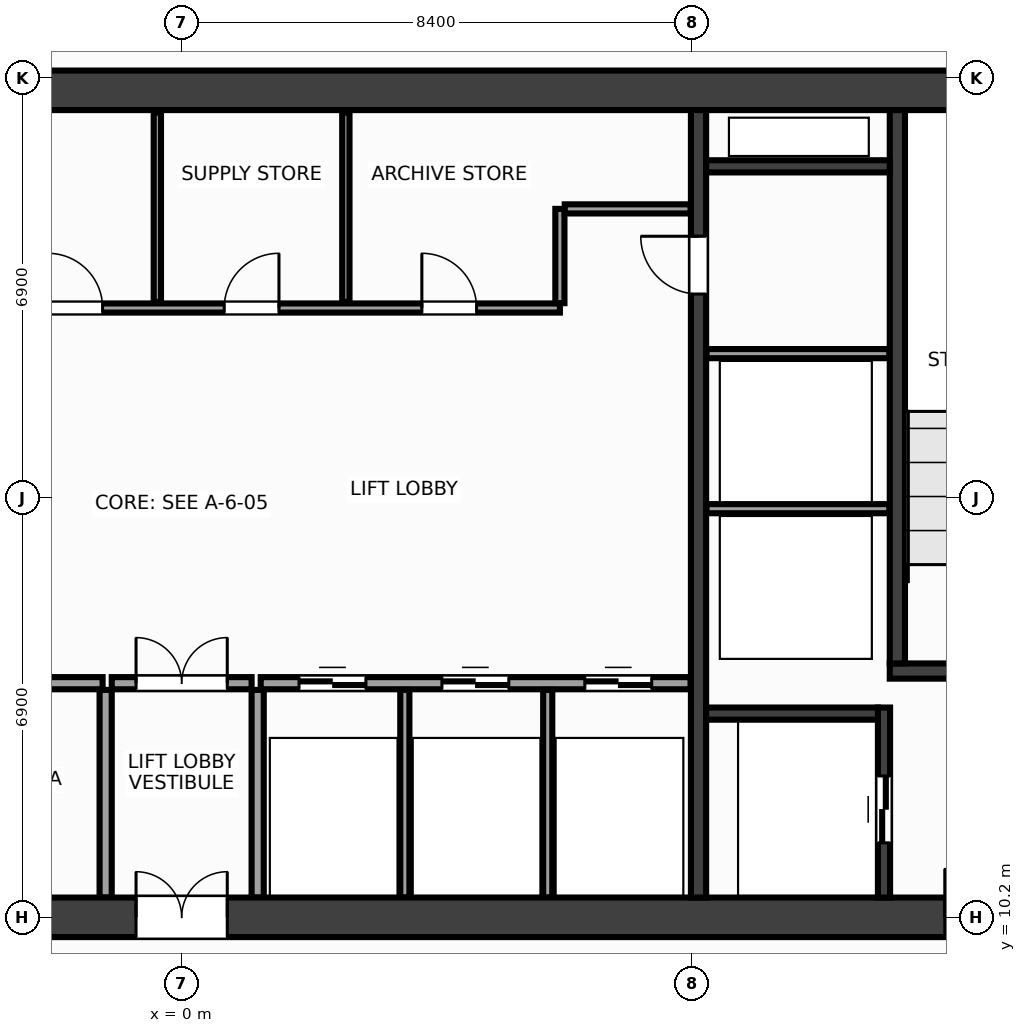
"""IFC4 building model, lengths in metres.
Left out: names, types, materials, properties, quantities, classifications, styles, units other than length and angle.
Written with IfcOpenShell. Run it as: python <this file> out.ifc"""

import sys

from ifc_helpers import new_model, si_unit, direction, frame, frame_2d, origin, place, context, subcontext, project, spatial, rectangle, extrude, source, transform, mapped, element, fill, save


model = new_model("IFC4")
c1 = context("Model", 3, precision=1e-05, world=origin(), true_north=direction((0.0, 1.0)))
c2 = subcontext(c1, "Body", "Model", "MODEL_VIEW")
j1 = project(units=[si_unit("LENGTHUNIT", "METRE"), si_unit("PLANEANGLEUNIT", "RADIAN")], contexts=[c1])
p1 = place(None, origin())
s1 = spatial("IfcSite", under=j1, at=p1, CompositionType="ELEMENT")
p2 = place(p1, origin())
s2 = spatial("IfcBuilding", under=s1, at=p2, CompositionType="ELEMENT")
p3 = place(p2, frame((0.0, 0.0, 142.4)))
s3 = spatial("IfcBuildingStorey", under=s2, at=p3, CompositionType="ELEMENT", Elevation=142.4)
m1 = source(origin(), c2, "Body", "SweptSolid", [
    extrude(rectangle(XDim=31.85, YDim=0.65, at=frame_2d((15.925, 0.0))), origin(), (0.0, 0.0, 1.0), 3.6),
])
p4 = place(p3, frame((-15.925, 23.8, 0.0), z_axis=(0.0, 0.0, 1.0), x_axis=(1.0, 0.0, 0.0)))
e1 = element("IfcWall", 1, at=p4, inside=s3, PredefinedType="SHEAR", context=c2, shape_type="MappedRepresentation", body=[
    mapped(m1, transform((0.0, 0.0, 0.0), x_axis=(1.0, 0.0, 0.0), y_axis=(0.0, 1.0, 0.0), z_axis=(0.0, 0.0, 1.0), scale=1.0)),
])
p5 = place(p3, frame((-15.925, 10.2, 0.0), z_axis=(0.0, 0.0, 1.0), x_axis=(1.0, 0.0, 0.0)))
e2 = element("IfcWall", 2, at=p5, inside=s3, PredefinedType="SHEAR", context=c2, shape_type="MappedRepresentation", body=[
    mapped(m1, transform((0.0, 0.0, 0.0), x_axis=(1.0, 0.0, 0.0), y_axis=(0.0, 1.0, 0.0), z_axis=(0.0, 0.0, 1.0), scale=1.0)),
])
p6 = place(p5, frame((1.775, 0.0, 0.0)))
e3 = element("IfcOpeningElement", 3, at=p6, cuts=e2, PredefinedType="OPENING", context=c2, shape_type="SweptSolid", body=[
    extrude(rectangle(XDim=1.6, YDim=2.15, at=frame_2d((0.8, 1.075))), frame((0.0, 0.337, 0.0), z_axis=(0.0, -1.0, 0.0), x_axis=(1.0, 0.0, 0.0)), (0.0, 0.0, 1.0), 0.674),
])
p7 = place(p5, frame((28.475, 0.0, 0.0)))
e4 = element("IfcOpeningElement", 4, at=p7, cuts=e2, PredefinedType="OPENING", context=c2, shape_type="SweptSolid", body=[
    extrude(rectangle(XDim=1.6, YDim=2.15, at=frame_2d((0.8, 1.075))), frame((0.0, 0.337, 0.0), z_axis=(0.0, -1.0, 0.0), x_axis=(1.0, 0.0, 0.0)), (0.0, 0.0, 1.0), 0.674),
])
p8 = place(p5, frame((15.175, 0.0, 0.0)))
e5 = element("IfcOpeningElement", 5, at=p8, cuts=e2, PredefinedType="OPENING", context=c2, shape_type="SweptSolid", body=[
    extrude(rectangle(XDim=1.5, YDim=2.2, at=frame_2d((0.75, 1.1))), frame((0.0, 0.337, 0.0), z_axis=(0.0, -1.0, 0.0), x_axis=(1.0, 0.0, 0.0)), (0.0, 0.0, 1.0), 0.674),
])
m2 = source(origin(), c2, "Body", "SweptSolid", [
    extrude(rectangle(XDim=12.95, YDim=0.25, at=frame_2d((6.475, 0.0))), origin(), (0.0, 0.0, 1.0), 3.6),
])
p9 = place(p3, frame((8.5, 10.525, 0.0), z_axis=(0.0, 0.0, 1.0), x_axis=(0.0, 1.0, 0.0)))
e6 = element("IfcWall", 6, at=p9, inside=s3, PredefinedType="SHEAR", context=c2, shape_type="MappedRepresentation", body=[
    mapped(m2, transform((0.0, 0.0, 0.0), x_axis=(1.0, 0.0, 0.0), y_axis=(0.0, 1.0, 0.0), z_axis=(0.0, 0.0, 1.0), scale=1.0)),
])
p10 = place(p9, frame((9.925, 0.0, 0.0)))
e7 = element("IfcOpeningElement", 7, at=p10, cuts=e6, PredefinedType="OPENING", context=c2, shape_type="SweptSolid", body=[
    extrude(rectangle(XDim=0.95, YDim=2.15, at=frame_2d((0.475, 1.075))), frame((0.0, 0.137, 0.0), z_axis=(0.0, -1.0, 0.0), x_axis=(1.0, 0.0, 0.0)), (0.0, 0.0, 1.0), 0.274),
])
m3 = source(origin(), c2, "Body", "SweptSolid", [
    extrude(rectangle(XDim=3.63, YDim=0.25, at=frame_2d((1.815, 0.0))), origin(), (0.0, 0.0, 1.0), 3.6),
])
p11 = place(p3, frame((11.645, 14.25, 0.0), z_axis=(0.0, 0.0, 1.0), x_axis=(1.0, 0.0, 0.0)))
e8 = element("IfcWall", 8, at=p11, inside=s3, PredefinedType="SHEAR", context=c2, shape_type="MappedRepresentation", body=[
    mapped(m3, transform((0.0, 0.0, 0.0), x_axis=(1.0, 0.0, 0.0), y_axis=(0.0, 1.0, 0.0), z_axis=(0.0, 0.0, 1.0), scale=1.0)),
])
p12 = place(p11, frame((0.95, 0.0, 0.0)))
e9 = element("IfcOpeningElement", 9, at=p12, cuts=e8, PredefinedType="OPENING", context=c2, shape_type="SweptSolid", body=[
    extrude(rectangle(XDim=1.6, YDim=2.15, at=frame_2d((0.8, 1.075))), frame((0.0, 0.137, 0.0), z_axis=(0.0, -1.0, 0.0), x_axis=(1.0, 0.0, 0.0)), (0.0, 0.0, 1.0), 0.274),
])
m4 = source(origin(), c2, "Body", "SweptSolid", [
    extrude(rectangle(XDim=9.1, YDim=0.25, at=frame_2d((4.55, 0.0))), origin(), (0.0, 0.0, 1.0), 3.6),
])
p13 = place(p3, frame((11.77, 14.375, 0.0), z_axis=(0.0, 0.0, 1.0), x_axis=(0.0, 1.0, 0.0)))
e10 = element("IfcWall", 10, at=p13, inside=s3, PredefinedType="SHEAR", context=c2, shape_type="MappedRepresentation", body=[
    mapped(m4, transform((0.0, 0.0, 0.0), x_axis=(1.0, 0.0, 0.0), y_axis=(0.0, 1.0, 0.0), z_axis=(0.0, 0.0, 1.0), scale=1.0)),
])
m5 = source(origin(), c2, "Body", "SweptSolid", [
    extrude(rectangle(XDim=3.125, YDim=0.2, at=frame_2d((1.562, 0.0))), origin(), (0.0, 0.0, 1.0), 3.6),
])
p14 = place(p3, frame((11.55, 10.525, 0.0), z_axis=(0.0, 0.0, 1.0), x_axis=(0.0, 1.0, 0.0)))
e11 = element("IfcWall", 11, at=p14, inside=s3, PredefinedType="SHEAR", context=c2, shape_type="MappedRepresentation", body=[
    mapped(m5, transform((0.0, 0.0, 0.0), x_axis=(1.0, 0.0, 0.0), y_axis=(0.0, 1.0, 0.0), z_axis=(0.0, 0.0, 1.0), scale=1.0)),
])
p15 = place(p14, frame((0.9, 0.0, 0.0)))
e12 = element("IfcOpeningElement", 12, at=p15, cuts=e11, PredefinedType="OPENING", context=c2, shape_type="SweptSolid", body=[
    extrude(rectangle(XDim=1.1, YDim=2.15, at=frame_2d((0.55, 1.075))), frame((0.0, 0.112, 0.0), z_axis=(0.0, -1.0, 0.0), x_axis=(1.0, 0.0, 0.0)), (0.0, 0.0, 1.0), 0.224),
])
m6 = source(origin(), c2, "Body", "SweptSolid", [
    extrude(rectangle(XDim=2.825, YDim=0.2, at=frame_2d((1.413, 0.0))), origin(), (0.0, 0.0, 1.0), 3.6),
])
p16 = place(p3, frame((8.625, 13.55, 0.0), z_axis=(0.0, 0.0, 1.0), x_axis=(1.0, 0.0, 0.0)))
e13 = element("IfcWall", 13, at=p16, inside=s3, PredefinedType="SHEAR", context=c2, shape_type="MappedRepresentation", body=[
    mapped(m6, transform((0.0, 0.0, 0.0), x_axis=(1.0, 0.0, 0.0), y_axis=(0.0, 1.0, 0.0), z_axis=(0.0, 0.0, 1.0), scale=1.0)),
])
m7 = source(origin(), c2, "Body", "SweptSolid", [
    extrude(rectangle(XDim=3.02, YDim=0.2, at=frame_2d((1.51, 0.0))), origin(), (0.0, 0.0, 1.0), 3.6),
])
p17 = place(p3, frame((8.625, 22.55, 0.0), z_axis=(0.0, 0.0, 1.0), x_axis=(1.0, 0.0, 0.0)))
e14 = element("IfcWall", 14, at=p17, inside=s3, PredefinedType="SHEAR", context=c2, shape_type="MappedRepresentation", body=[
    mapped(m7, transform((0.0, 0.0, 0.0), x_axis=(1.0, 0.0, 0.0), y_axis=(0.0, 1.0, 0.0), z_axis=(0.0, 0.0, 1.0), scale=1.0)),
])
m8 = source(origin(), c2, "Body", "SweptSolid", [
    extrude(rectangle(XDim=3.01, YDim=0.15, at=frame_2d((1.505, 0.0))), origin(), (0.0, 0.0, 1.0), 3.38),
])
for number, where, z_axis, x_axis in (
    (15, (8.63, 16.92, 0.0), (0.0, 0.0, 1.0), (1.0, 0.0, 0.0)),
    (16, (8.63, 19.47, 0.0), (0.0, 0.0, 1.0), (1.0, 0.0, 0.0)),
):
    element("IfcWall", number, at=place(p3, frame(where, z_axis=z_axis, x_axis=x_axis)), inside=s3, PredefinedType="PARTITIONING", context=c2, shape_type="MappedRepresentation", body=[
        mapped(m8, transform((0.0, 0.0, 0.0), x_axis=(1.0, 0.0, 0.0), y_axis=(0.0, 1.0, 0.0), z_axis=(0.0, 0.0, 1.0), scale=1.0)),
    ])
m9 = source(origin(), c2, "Body", "SweptSolid", [
    extrude(rectangle(XDim=7.07, YDim=0.2, at=frame_2d((3.535, 0.0))), origin(), (0.0, 0.0, 1.0), 3.38),
])
p18 = place(p3, frame((-8.37, 14.05, 0.0), z_axis=(0.0, 0.0, 1.0), x_axis=(1.0, 0.0, 0.0)))
e17 = element("IfcWall", 17, at=p18, inside=s3, PredefinedType="PARTITIONING", context=c2, shape_type="MappedRepresentation", body=[
    mapped(m9, transform((0.0, 0.0, 0.0), x_axis=(1.0, 0.0, 0.0), y_axis=(0.0, 1.0, 0.0), z_axis=(0.0, 0.0, 1.0), scale=1.0)),
])
p19 = place(p18, frame((1.06, 0.0, 0.0)))
e18 = element("IfcOpeningElement", 18, at=p19, cuts=e17, PredefinedType="OPENING", context=c2, shape_type="SweptSolid", body=[
    extrude(rectangle(XDim=0.9, YDim=2.15, at=frame_2d((0.45, 1.075))), frame((0.0, 0.112, 0.0), z_axis=(0.0, -1.0, 0.0), x_axis=(1.0, 0.0, 0.0)), (0.0, 0.0, 1.0), 0.224),
])
p20 = place(p18, frame((4.51, 0.0, 0.0)))
e19 = element("IfcOpeningElement", 19, at=p20, cuts=e17, PredefinedType="OPENING", context=c2, shape_type="SweptSolid", body=[
    extrude(rectangle(XDim=0.9, YDim=2.15, at=frame_2d((0.45, 1.075))), frame((0.0, 0.112, 0.0), z_axis=(0.0, -1.0, 0.0), x_axis=(1.0, 0.0, 0.0)), (0.0, 0.0, 1.0), 0.224),
])
p21 = place(p3, frame((1.3, 14.05, 0.0), z_axis=(0.0, 0.0, 1.0), x_axis=(1.0, 0.0, 0.0)))
e20 = element("IfcWall", 20, at=p21, inside=s3, PredefinedType="PARTITIONING", context=c2, shape_type="MappedRepresentation", body=[
    mapped(m9, transform((0.0, 0.0, 0.0), x_axis=(1.0, 0.0, 0.0), y_axis=(0.0, 1.0, 0.0), z_axis=(0.0, 0.0, 1.0), scale=1.0)),
])
p22 = place(p21, frame((0.63, 0.0, 0.0)))
e21 = element("IfcOpeningElement", 21, at=p22, cuts=e20, PredefinedType="OPENING", context=c2, shape_type="SweptSolid", body=[
    extrude(rectangle(XDim=1.1, YDim=2.15, at=frame_2d((0.55, 1.075))), frame((0.0, 0.112, 0.0), z_axis=(0.0, -1.0, 0.0), x_axis=(1.0, 0.0, 0.0)), (0.0, 0.0, 1.0), 0.224),
])
p23 = place(p21, frame((2.98, 0.0, 0.0)))
e22 = element("IfcOpeningElement", 22, at=p23, cuts=e20, PredefinedType="OPENING", context=c2, shape_type="SweptSolid", body=[
    extrude(rectangle(XDim=1.1, YDim=2.15, at=frame_2d((0.55, 1.075))), frame((0.0, 0.112, 0.0), z_axis=(0.0, -1.0, 0.0), x_axis=(1.0, 0.0, 0.0)), (0.0, 0.0, 1.0), 0.224),
])
p24 = place(p21, frame((5.33, 0.0, 0.0)))
e23 = element("IfcOpeningElement", 23, at=p24, cuts=e20, PredefinedType="OPENING", context=c2, shape_type="SweptSolid", body=[
    extrude(rectangle(XDim=1.1, YDim=2.15, at=frame_2d((0.55, 1.075))), frame((0.0, 0.112, 0.0), z_axis=(0.0, -1.0, 0.0), x_axis=(1.0, 0.0, 0.0)), (0.0, 0.0, 1.0), 0.224),
])
m10 = source(origin(), c2, "Body", "SweptSolid", [
    extrude(rectangle(XDim=3.415, YDim=0.2, at=frame_2d((1.708, 0.0))), origin(), (0.0, 0.0, 1.0), 3.38),
])
for number, where, z_axis, x_axis in (
    (24, (-1.25, 10.525, 0.0), (0.0, 0.0, 1.0), (0.0, 1.0, 0.0)),
    (25, (1.25, 10.525, 0.0), (0.0, 0.0, 1.0), (0.0, 1.0, 0.0)),
):
    element("IfcWall", number, at=place(p3, frame(where, z_axis=z_axis, x_axis=x_axis)), inside=s3, PredefinedType="PARTITIONING", context=c2, shape_type="MappedRepresentation", body=[
        mapped(m10, transform((0.0, 0.0, 0.0), x_axis=(1.0, 0.0, 0.0), y_axis=(0.0, 1.0, 0.0), z_axis=(0.0, 0.0, 1.0), scale=1.0)),
    ])
m11 = source(origin(), c2, "Body", "SweptSolid", [
    extrude(rectangle(XDim=2.3, YDim=0.2, at=frame_2d((1.15, 0.0))), origin(), (0.0, 0.0, 1.0), 3.38),
])
p25 = place(p3, frame((-1.15, 14.05, 0.0), z_axis=(0.0, 0.0, 1.0), x_axis=(1.0, 0.0, 0.0)))
e26 = element("IfcWall", 26, at=p25, inside=s3, PredefinedType="PARTITIONING", context=c2, shape_type="MappedRepresentation", body=[
    mapped(m11, transform((0.0, 0.0, 0.0), x_axis=(1.0, 0.0, 0.0), y_axis=(0.0, 1.0, 0.0), z_axis=(0.0, 0.0, 1.0), scale=1.0)),
])
p26 = place(p25, frame((0.4, 0.0, 0.0)))
e27 = element("IfcOpeningElement", 27, at=p26, cuts=e26, PredefinedType="OPENING", context=c2, shape_type="SweptSolid", body=[
    extrude(rectangle(XDim=1.5, YDim=2.2, at=frame_2d((0.75, 1.1))), frame((0.0, 0.112, 0.0), z_axis=(0.0, -1.0, 0.0), x_axis=(1.0, 0.0, 0.0)), (0.0, 0.0, 1.0), 0.224),
])
m12 = source(origin(), c2, "Body", "SweptSolid", [
    extrude(rectangle(XDim=14.59, YDim=0.15, at=frame_2d((7.295, 0.0))), origin(), (0.0, 0.0, 1.0), 3.38),
])
p27 = place(p3, frame((-8.37, 20.22, 0.0), z_axis=(0.0, 0.0, 1.0), x_axis=(1.0, 0.0, 0.0)))
e28 = element("IfcWall", 28, at=p27, inside=s3, PredefinedType="PARTITIONING", context=c2, shape_type="MappedRepresentation", body=[
    mapped(m12, transform((0.0, 0.0, 0.0), x_axis=(1.0, 0.0, 0.0), y_axis=(0.0, 1.0, 0.0), z_axis=(0.0, 0.0, 1.0), scale=1.0)),
])
p28 = place(p27, frame((0.86, 0.0, 0.0)))
e29 = element("IfcOpeningElement", 29, at=p28, cuts=e28, PredefinedType="OPENING", context=c2, shape_type="SweptSolid", body=[
    extrude(rectangle(XDim=0.9, YDim=2.15, at=frame_2d((0.45, 1.075))), frame((0.0, 0.087, 0.0), z_axis=(0.0, -1.0, 0.0), x_axis=(1.0, 0.0, 0.0)), (0.0, 0.0, 1.0), 0.174),
])
p29 = place(p27, frame((3.47, 0.0, 0.0)))
e30 = element("IfcOpeningElement", 30, at=p29, cuts=e28, PredefinedType="OPENING", context=c2, shape_type="SweptSolid", body=[
    extrude(rectangle(XDim=0.9, YDim=2.15, at=frame_2d((0.45, 1.075))), frame((0.0, 0.087, 0.0), z_axis=(0.0, -1.0, 0.0), x_axis=(1.0, 0.0, 0.0)), (0.0, 0.0, 1.0), 0.174),
])
p30 = place(p27, frame((6.17, 0.0, 0.0)))
e31 = element("IfcOpeningElement", 31, at=p30, cuts=e28, PredefinedType="OPENING", context=c2, shape_type="SweptSolid", body=[
    extrude(rectangle(XDim=0.9, YDim=2.15, at=frame_2d((0.45, 1.075))), frame((0.0, 0.087, 0.0), z_axis=(0.0, -1.0, 0.0), x_axis=(1.0, 0.0, 0.0)), (0.0, 0.0, 1.0), 0.174),
])
p31 = place(p27, frame((9.07, 0.0, 0.0)))
e32 = element("IfcOpeningElement", 32, at=p31, cuts=e28, PredefinedType="OPENING", context=c2, shape_type="SweptSolid", body=[
    extrude(rectangle(XDim=0.9, YDim=2.15, at=frame_2d((0.45, 1.075))), frame((0.0, 0.087, 0.0), z_axis=(0.0, -1.0, 0.0), x_axis=(1.0, 0.0, 0.0)), (0.0, 0.0, 1.0), 0.174),
])
p32 = place(p27, frame((12.32, 0.0, 0.0)))
e33 = element("IfcOpeningElement", 33, at=p32, cuts=e28, PredefinedType="OPENING", context=c2, shape_type="SweptSolid", body=[
    extrude(rectangle(XDim=0.9, YDim=2.15, at=frame_2d((0.45, 1.075))), frame((0.0, 0.087, 0.0), z_axis=(0.0, -1.0, 0.0), x_axis=(1.0, 0.0, 0.0)), (0.0, 0.0, 1.0), 0.174),
])
m13 = source(origin(), c2, "Body", "SweptSolid", [
    extrude(rectangle(XDim=1.55, YDim=0.15, at=frame_2d((0.775, 0.0))), origin(), (0.0, 0.0, 1.0), 3.38),
])
p33 = place(p3, frame((6.22, 20.3, 0.0), z_axis=(0.0, 0.0, 1.0), x_axis=(0.0, 1.0, 0.0)))
e34 = element("IfcWall", 34, at=p33, inside=s3, PredefinedType="PARTITIONING", context=c2, shape_type="MappedRepresentation", body=[
    mapped(m13, transform((0.0, 0.0, 0.0), x_axis=(1.0, 0.0, 0.0), y_axis=(0.0, 1.0, 0.0), z_axis=(0.0, 0.0, 1.0), scale=1.0)),
])
m14 = source(origin(), c2, "Body", "SweptSolid", [
    extrude(rectangle(XDim=2.07, YDim=0.15, at=frame_2d((1.035, 0.0))), origin(), (0.0, 0.0, 1.0), 3.38),
])
p34 = place(p3, frame((6.3, 21.85, 0.0), z_axis=(0.0, 0.0, 1.0), x_axis=(1.0, 0.0, 0.0)))
e35 = element("IfcWall", 35, at=p34, inside=s3, PredefinedType="PARTITIONING", context=c2, shape_type="MappedRepresentation", body=[
    mapped(m14, transform((0.0, 0.0, 0.0), x_axis=(1.0, 0.0, 0.0), y_axis=(0.0, 1.0, 0.0), z_axis=(0.0, 0.0, 1.0), scale=1.0)),
])
m15 = source(origin(), c2, "Body", "SweptSolid", [
    extrude(rectangle(XDim=3.415, YDim=0.15, at=frame_2d((1.708, 0.0))), origin(), (0.0, 0.0, 1.0), 3.38),
])
for number, where, z_axis, x_axis in (
    (36, (3.67, 10.525, 0.0), (0.0, 0.0, 1.0), (0.0, 1.0, 0.0)),
    (37, (6.02, 10.525, 0.0), (0.0, 0.0, 1.0), (0.0, 1.0, 0.0)),
):
    element("IfcWall", number, at=place(p3, frame(where, z_axis=z_axis, x_axis=x_axis)), inside=s3, PredefinedType="PARTITIONING", context=c2, shape_type="MappedRepresentation", body=[
        mapped(m15, transform((0.0, 0.0, 0.0), x_axis=(1.0, 0.0, 0.0), y_axis=(0.0, 1.0, 0.0), z_axis=(0.0, 0.0, 1.0), scale=1.0)),
    ])
m16 = source(origin(), c2, "Body", "SweptSolid", [
    extrude(rectangle(XDim=3.115, YDim=0.12, at=frame_2d((1.558, 0.0))), origin(), (0.0, 0.0, 1.0), 3.38),
])
for number, where, z_axis, x_axis in (
    (38, (-0.4, 20.32, 0.0), (0.0, 0.0, 1.0), (0.0, 1.0, 0.0)),
    (39, (2.7, 20.32, 0.0), (0.0, 0.0, 1.0), (0.0, 1.0, 0.0)),
):
    element("IfcWall", number, at=place(p3, frame(where, z_axis=z_axis, x_axis=x_axis)), inside=s3, PredefinedType="PARTITIONING", context=c2, shape_type="MappedRepresentation", body=[
        mapped(m16, transform((0.0, 0.0, 0.0), x_axis=(1.0, 0.0, 0.0), y_axis=(0.0, 1.0, 0.0), z_axis=(0.0, 0.0, 1.0), scale=1.0)),
    ])
m17 = source(origin(), c2, "Body", "SweptSolid", [
    extrude(rectangle(XDim=1.6, YDim=2.15, at=frame_2d((0.8, 1.075))), frame((0.0, 0.025, 0.0), z_axis=(0.0, -1.0, 0.0), x_axis=(1.0, 0.0, 0.0)), (0.0, 0.0, 1.0), 0.05),
])
p35 = place(p7, origin())
e40 = element("IfcDoor", 40, at=p35, inside=s3, OperationType="DOUBLE_DOOR_SINGLE_SWING", PredefinedType="DOOR", context=c2, shape_type="MappedRepresentation", body=[
    mapped(m17, transform((0.0, 0.0, 0.0), x_axis=(1.0, 0.0, 0.0), y_axis=(0.0, 1.0, 0.0), z_axis=(0.0, 0.0, 1.0), scale=1.0)),
])
fill(e4, e40)
m18 = source(origin(), c2, "Body", "SweptSolid", [
    extrude(rectangle(XDim=1.1, YDim=2.15, at=frame_2d((0.55, 1.075))), frame((0.0, 0.025, 0.0), z_axis=(0.0, -1.0, 0.0), x_axis=(1.0, 0.0, 0.0)), (0.0, 0.0, 1.0), 0.05),
])
p36 = place(p15, origin())
e41 = element("IfcDoor", 41, at=p36, inside=s3, OperationType="DOUBLE_DOOR_SLIDING", PredefinedType="DOOR", context=c2, shape_type="MappedRepresentation", body=[
    mapped(m18, transform((0.0, 0.0, 0.0), x_axis=(1.0, 0.0, 0.0), y_axis=(0.0, 1.0, 0.0), z_axis=(0.0, 0.0, 1.0), scale=1.0)),
])
fill(e12, e41)
m19 = source(origin(), c2, "Body", "SweptSolid", [
    extrude(rectangle(XDim=0.95, YDim=2.15, at=frame_2d((0.475, 1.075))), frame((0.0, 0.025, 0.0), z_axis=(0.0, -1.0, 0.0), x_axis=(1.0, 0.0, 0.0)), (0.0, 0.0, 1.0), 0.05),
])
p37 = place(p10, origin())
e42 = element("IfcDoor", 42, at=p37, inside=s3, OperationType="SINGLE_SWING_RIGHT", PredefinedType="DOOR", context=c2, shape_type="MappedRepresentation", body=[
    mapped(m19, transform((0.0, 0.0, 0.0), x_axis=(1.0, 0.0, 0.0), y_axis=(0.0, 1.0, 0.0), z_axis=(0.0, 0.0, 1.0), scale=1.0)),
])
fill(e7, e42)
p38 = place(p22, origin())
e43 = element("IfcDoor", 43, at=p38, inside=s3, OperationType="DOUBLE_DOOR_SLIDING", PredefinedType="DOOR", context=c2, shape_type="MappedRepresentation", body=[
    mapped(m18, transform((0.0, 0.0, 0.0), x_axis=(1.0, 0.0, 0.0), y_axis=(0.0, 1.0, 0.0), z_axis=(0.0, 0.0, 1.0), scale=1.0)),
])
fill(e21, e43)
p39 = place(p23, origin())
e44 = element("IfcDoor", 44, at=p39, inside=s3, OperationType="DOUBLE_DOOR_SLIDING", PredefinedType="DOOR", context=c2, shape_type="MappedRepresentation", body=[
    mapped(m18, transform((0.0, 0.0, 0.0), x_axis=(1.0, 0.0, 0.0), y_axis=(0.0, 1.0, 0.0), z_axis=(0.0, 0.0, 1.0), scale=1.0)),
])
fill(e22, e44)
p40 = place(p24, origin())
e45 = element("IfcDoor", 45, at=p40, inside=s3, OperationType="DOUBLE_DOOR_SLIDING", PredefinedType="DOOR", context=c2, shape_type="MappedRepresentation", body=[
    mapped(m18, transform((0.0, 0.0, 0.0), x_axis=(1.0, 0.0, 0.0), y_axis=(0.0, 1.0, 0.0), z_axis=(0.0, 0.0, 1.0), scale=1.0)),
])
fill(e23, e45)
m20 = source(origin(), c2, "Body", "SweptSolid", [
    extrude(rectangle(XDim=1.5, YDim=2.2, at=frame_2d((0.75, 1.1))), frame((0.0, 0.025, 0.0), z_axis=(0.0, -1.0, 0.0), x_axis=(1.0, 0.0, 0.0)), (0.0, 0.0, 1.0), 0.05),
])
p41 = place(p26, origin())
e46 = element("IfcDoor", 46, at=p41, inside=s3, OperationType="DOUBLE_DOOR_SINGLE_SWING", PredefinedType="DOOR", context=c2, shape_type="MappedRepresentation", body=[
    mapped(m20, transform((0.0, 0.0, 0.0), x_axis=(1.0, 0.0, 0.0), y_axis=(0.0, 1.0, 0.0), z_axis=(0.0, 0.0, 1.0), scale=1.0)),
])
fill(e27, e46)
p42 = place(p8, origin())
e47 = element("IfcDoor", 47, at=p42, inside=s3, OperationType="DOUBLE_DOOR_SINGLE_SWING", PredefinedType="DOOR", context=c2, shape_type="MappedRepresentation", body=[
    mapped(m20, transform((0.0, 0.0, 0.0), x_axis=(1.0, 0.0, 0.0), y_axis=(0.0, 1.0, 0.0), z_axis=(0.0, 0.0, 1.0), scale=1.0)),
])
fill(e5, e47)
m21 = source(origin(), c2, "Body", "SweptSolid", [
    extrude(rectangle(XDim=0.9, YDim=2.15, at=frame_2d((0.45, 1.075))), frame((0.0, 0.025, 0.0), z_axis=(0.0, -1.0, 0.0), x_axis=(1.0, 0.0, 0.0)), (0.0, 0.0, 1.0), 0.05),
])
p43 = place(p30, origin())
e48 = element("IfcDoor", 48, at=p43, inside=s3, OperationType="SINGLE_SWING_LEFT", PredefinedType="DOOR", context=c2, shape_type="MappedRepresentation", body=[
    mapped(m21, transform((0.0, 0.0, 0.0), x_axis=(1.0, 0.0, 0.0), y_axis=(0.0, 1.0, 0.0), z_axis=(0.0, 0.0, 1.0), scale=1.0)),
])
fill(e31, e48)
p44 = place(p31, origin())
e49 = element("IfcDoor", 49, at=p44, inside=s3, OperationType="SINGLE_SWING_RIGHT", PredefinedType="DOOR", context=c2, shape_type="MappedRepresentation", body=[
    mapped(m21, transform((0.0, 0.0, 0.0), x_axis=(1.0, 0.0, 0.0), y_axis=(0.0, 1.0, 0.0), z_axis=(0.0, 0.0, 1.0), scale=1.0)),
])
fill(e32, e49)
p45 = place(p32, origin())
e50 = element("IfcDoor", 50, at=p45, inside=s3, OperationType="SINGLE_SWING_LEFT", PredefinedType="DOOR", context=c2, shape_type="MappedRepresentation", body=[
    mapped(m21, transform((0.0, 0.0, 0.0), x_axis=(1.0, 0.0, 0.0), y_axis=(0.0, 1.0, 0.0), z_axis=(0.0, 0.0, 1.0), scale=1.0)),
])
fill(e33, e50)
save(model, sys.argv[1])
